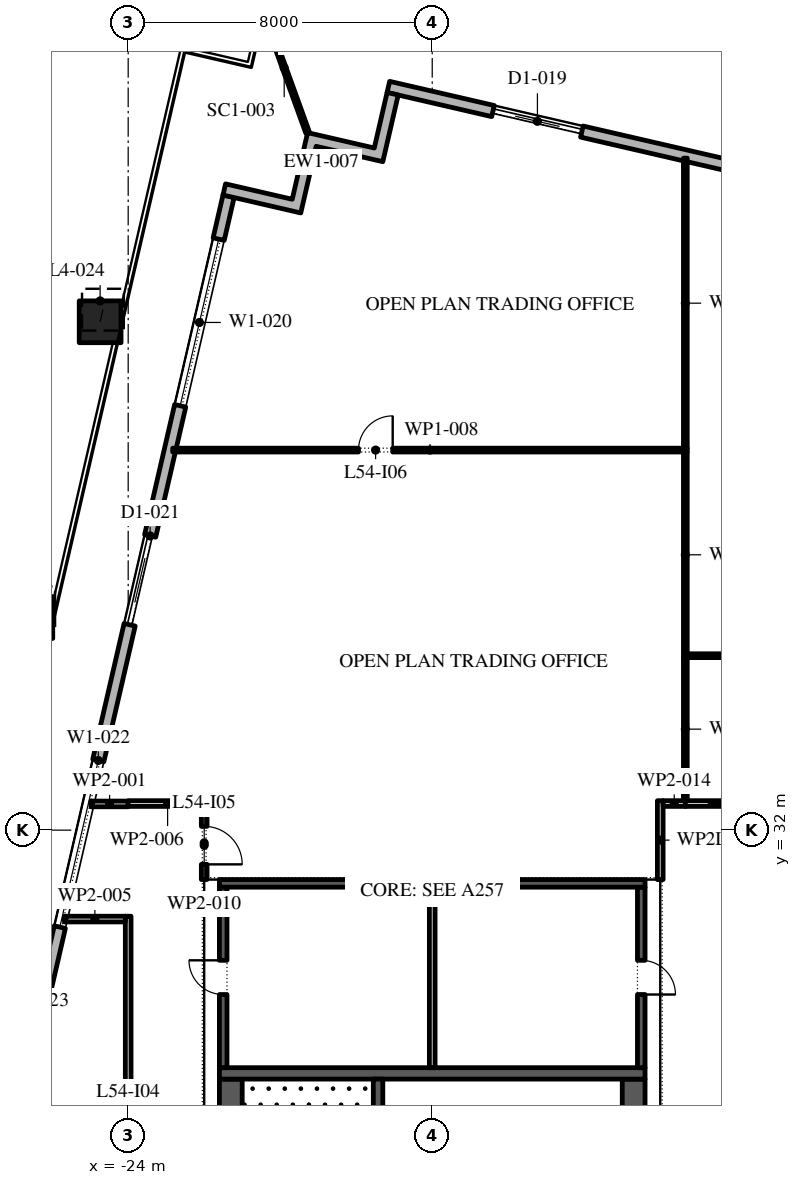
"""IFC4 building model, lengths in metres.
Left out: names, types, materials, properties, quantities, classifications, styles, units other than length and angle.
Written with IfcOpenShell. Run it as: python <this file> out.ifc"""

import sys

from ifc_helpers import new_model, si_unit, direction, frame, frame_2d, origin, origin_2d, place, context, subcontext, project, spatial, polyline, rectangle, outline, extrude, element, fill, save


model = new_model("IFC4")
c1 = context("Model", 3, precision=1e-05, world=origin(), true_north=direction((0.0, 1.0)))
c2 = subcontext(c1, "Body", "Model", "MODEL_VIEW")
j1 = project(units=[si_unit("LENGTHUNIT", "METRE"), si_unit("PLANEANGLEUNIT", "RADIAN")], contexts=[c1])
p1 = place(None, origin())
s1 = spatial("IfcSite", under=j1, at=p1, CompositionType="ELEMENT")
p2 = place(p1, origin())
s2 = spatial("IfcBuilding", under=s1, at=p2, CompositionType="ELEMENT")
p3 = place(p2, frame((0.0, 0.0, 251.4)))
s3 = spatial("IfcBuildingStorey", under=s2, at=p3, CompositionType="ELEMENT", Elevation=251.4)
p4 = place(p3, frame((-24.738, 45.376, 0.0), z_axis=(0.017443081717, 0.075683271502, 0.996979328429), x_axis=(-0.974454034257, 0.224587032398, 0.0)))
e1 = element("IfcColumn", 1, at=p4, inside=s3, PredefinedType="COLUMN", context=c2, shape_type="SweptSolid", body=[
    extrude(rectangle(XDim=1.1, YDim=1.1, at=origin_2d()), origin(), (0.0, 0.0, 1.0), 4.213),
])
p5 = place(p3, frame((-26.535, 37.594, 0.0), z_axis=(0.014558999143, 0.063108330945, 0.997900483069), x_axis=(-0.97440628778, 0.224794097641, 0.0)))
e2 = element("IfcColumn", 2, at=p5, inside=s3, PredefinedType="COLUMN", context=c2, shape_type="SweptSolid", body=[
    extrude(rectangle(XDim=1.1, YDim=1.1, at=origin_2d()), origin(), (0.0, 0.0, 1.0), 4.209),
])
p6 = place(p3, frame((29.616, 40.758, 0.0), z_axis=(0.0, 0.0, 1.0), x_axis=(-0.974370532314, 0.224949029246, 0.0)))
e3 = element("IfcWall", 3, at=p6, inside=s3, PredefinedType="STANDARD", context=c2, shape_type="SweptSolid", body=[
    extrude(rectangle(XDim=48.0, YDim=0.3, at=frame_2d((24.0, 0.0))), origin(), (0.0, 0.0, 1.0), 4.0),
])
p7 = place(p6, frame((1.625, 0.0, 0.45)))
e4 = element("IfcOpeningElement", 4, at=p7, cuts=e3, PredefinedType="OPENING", context=c2, shape_type="SweptSolid", body=[
    extrude(rectangle(XDim=4.5, YDim=2.675, at=frame_2d((2.25, 1.337))), frame((0.0, 0.16, 0.0), z_axis=(0.0, -1.0, 0.0), x_axis=(1.0, 0.0, 0.0)), (0.0, 0.0, 1.0), 0.32),
])
p8 = place(p6, frame((9.975, 0.0, 0.0)))
e5 = element("IfcOpeningElement", 5, at=p8, cuts=e3, PredefinedType="OPENING", context=c2, shape_type="SweptSolid", body=[
    extrude(rectangle(XDim=2.4, YDim=3.5, at=frame_2d((1.2, 1.75))), frame((0.0, 0.16, 0.0), z_axis=(0.0, -1.0, 0.0), x_axis=(1.0, 0.0, 0.0)), (0.0, 0.0, 1.0), 0.32),
])
p9 = place(p6, frame((17.575, 0.0, 0.45)))
e6 = element("IfcOpeningElement", 6, at=p9, cuts=e3, PredefinedType="OPENING", context=c2, shape_type="SweptSolid", body=[
    extrude(rectangle(XDim=4.5, YDim=2.525, at=frame_2d((2.25, 1.262))), frame((0.0, 0.16, 0.0), z_axis=(0.0, -1.0, 0.0), x_axis=(1.0, 0.0, 0.0)), (0.0, 0.0, 1.0), 0.32),
])
p10 = place(p6, frame((25.625, 0.0, 0.45)))
e7 = element("IfcOpeningElement", 7, at=p10, cuts=e3, PredefinedType="OPENING", context=c2, shape_type="SweptSolid", body=[
    extrude(rectangle(XDim=4.5, YDim=2.45, at=frame_2d((2.25, 1.225))), frame((0.0, 0.16, 0.0), z_axis=(0.0, -1.0, 0.0), x_axis=(1.0, 0.0, 0.0)), (0.0, 0.0, 1.0), 0.32),
])
p11 = place(p6, frame((33.675, 0.0, 0.45)))
e8 = element("IfcOpeningElement", 8, at=p11, cuts=e3, PredefinedType="OPENING", context=c2, shape_type="SweptSolid", body=[
    extrude(rectangle(XDim=4.5, YDim=2.45, at=frame_2d((2.25, 1.225))), frame((0.0, 0.16, 0.0), z_axis=(0.0, -1.0, 0.0), x_axis=(1.0, 0.0, 0.0)), (0.0, 0.0, 1.0), 0.32),
])
p12 = place(p6, frame((42.775, 0.0, 0.0)))
e9 = element("IfcOpeningElement", 9, at=p12, cuts=e3, PredefinedType="OPENING", context=c2, shape_type="SweptSolid", body=[
    extrude(rectangle(XDim=2.4, YDim=3.5, at=frame_2d((1.2, 1.75))), frame((0.0, 0.16, 0.0), z_axis=(0.0, -1.0, 0.0), x_axis=(1.0, 0.0, 0.0)), (0.0, 0.0, 1.0), 0.32),
])
p13 = place(p3, frame((-21.359, 48.678, 0.0), z_axis=(0.0, 0.0, 1.0), x_axis=(-0.224949198343, -0.974370493275, 0.0)))
e10 = element("IfcWall", 10, at=p13, inside=s3, PredefinedType="STANDARD", context=c2, shape_type="SweptSolid", body=[
    extrude(rectangle(XDim=49.5, YDim=0.3, at=frame_2d((24.75, 0.0))), origin(), (0.0, 0.0, 1.0), 4.0),
])
p14 = place(p13, frame((1.157, 0.0, 0.45)))
e11 = element("IfcOpeningElement", 11, at=p14, cuts=e10, PredefinedType="OPENING", context=c2, shape_type="SweptSolid", body=[
    extrude(rectangle(XDim=4.5, YDim=3.05, at=frame_2d((2.25, 1.525))), frame((0.0, 0.16, 0.0), z_axis=(0.0, -1.0, 0.0), x_axis=(1.0, 0.0, 0.0)), (0.0, 0.0, 1.0), 0.32),
])
p15 = place(p13, frame((9.171, 0.0, 0.0)))
e12 = element("IfcOpeningElement", 12, at=p15, cuts=e10, PredefinedType="OPENING", context=c2, shape_type="SweptSolid", body=[
    extrude(rectangle(XDim=2.4, YDim=3.5, at=frame_2d((1.2, 1.75))), frame((0.0, 0.16, 0.0), z_axis=(0.0, -1.0, 0.0), x_axis=(1.0, 0.0, 0.0)), (0.0, 0.0, 1.0), 0.32),
])
p16 = place(p13, frame((15.236, 0.0, 0.45)))
e13 = element("IfcOpeningElement", 13, at=p16, cuts=e10, PredefinedType="OPENING", context=c2, shape_type="SweptSolid", body=[
    extrude(rectangle(XDim=4.5, YDim=3.05, at=frame_2d((2.25, 1.525))), frame((0.0, 0.16, 0.0), z_axis=(0.0, -1.0, 0.0), x_axis=(1.0, 0.0, 0.0)), (0.0, 0.0, 1.0), 0.32),
])
p17 = place(p13, frame((22.35, 0.0, 0.45)))
e14 = element("IfcOpeningElement", 14, at=p17, cuts=e10, PredefinedType="OPENING", context=c2, shape_type="SweptSolid", body=[
    extrude(rectangle(XDim=4.5, YDim=3.05, at=frame_2d((2.25, 1.525))), frame((0.0, 0.16, 0.0), z_axis=(0.0, -1.0, 0.0), x_axis=(1.0, 0.0, 0.0)), (0.0, 0.0, 1.0), 0.32),
])
p18 = place(p13, frame((29.464, 0.0, 0.45)))
e15 = element("IfcOpeningElement", 15, at=p18, cuts=e10, PredefinedType="OPENING", context=c2, shape_type="SweptSolid", body=[
    extrude(rectangle(XDim=4.5, YDim=3.05, at=frame_2d((2.25, 1.525))), frame((0.0, 0.16, 0.0), z_axis=(0.0, -1.0, 0.0), x_axis=(1.0, 0.0, 0.0)), (0.0, 0.0, 1.0), 0.32),
])
p19 = place(p13, frame((37.628, 0.0, 0.0)))
e16 = element("IfcOpeningElement", 16, at=p19, cuts=e10, PredefinedType="OPENING", context=c2, shape_type="SweptSolid", body=[
    extrude(rectangle(XDim=2.4, YDim=3.325, at=frame_2d((1.2, 1.663))), frame((0.0, 0.16, 0.0), z_axis=(0.0, -1.0, 0.0), x_axis=(1.0, 0.0, 0.0)), (0.0, 0.0, 1.0), 0.32),
])
p20 = place(p13, frame((43.693, 0.0, 0.45)))
e17 = element("IfcOpeningElement", 17, at=p20, cuts=e10, PredefinedType="OPENING", context=c2, shape_type="SweptSolid", body=[
    extrude(rectangle(XDim=4.5, YDim=2.825, at=frame_2d((2.25, 1.413))), frame((0.0, 0.16, 0.0), z_axis=(0.0, -1.0, 0.0), x_axis=(1.0, 0.0, 0.0)), (0.0, 0.0, 1.0), 0.32),
])
p21 = place(p3, origin())
e18 = element("IfcWall", 18, at=p21, inside=s3, PredefinedType="STANDARD", context=c2, shape_type="SweptSolid", body=[
    extrude(outline(polyline([(-21.505, 48.712), (-21.438, 49.004), (-19.684, 48.599), (-19.279, 50.353), (-17.525, 49.948), (-17.188, 51.41), (-16.895, 51.342), (-17.3, 49.588), (-19.054, 49.993), (-19.459, 48.24), (-21.505, 48.712)])), origin(), (0.0, 0.0, 1.0), 4.0),
])
p22 = place(p3, frame((-19.279, 50.353, -0.05), z_axis=(0.0, 0.0, 1.0), x_axis=(-0.340464729294, 0.94025728825, 0.0)))
e19 = element("IfcWall", 19, at=p22, inside=s3, PredefinedType="STANDARD", context=c2, shape_type="SweptSolid", body=[
    extrude(rectangle(XDim=3.62, YDim=0.1, at=frame_2d((1.81, 0.0))), origin(), (0.0, 0.0, 1.0), 4.05),
])
p23 = place(p3, frame((-21.3, -2.45, 0.0), z_axis=(0.0, 0.0, 1.0), x_axis=(0.0, 1.0, 0.0)))
e20 = element("IfcWall", 20, at=p23, inside=s3, PredefinedType="SHEAR", context=c2, shape_type="SweptSolid", body=[
    extrude(rectangle(XDim=27.9, YDim=0.6, at=frame_2d((13.95, 0.0))), origin(), (0.0, 0.0, 1.0), 4.0),
])
p24 = place(p23, frame((5.05, 0.0, 0.0)))
e21 = element("IfcOpeningElement", 21, at=p24, cuts=e20, PredefinedType="OPENING", context=c2, shape_type="SweptSolid", body=[
    extrude(rectangle(XDim=1.2, YDim=2.1, at=frame_2d((0.6, 1.05))), frame((0.0, 0.31, 0.0), z_axis=(0.0, -1.0, 0.0), x_axis=(1.0, 0.0, 0.0)), (0.0, 0.0, 1.0), 0.62),
])
p25 = place(p23, frame((21.65, 0.0, 0.0)))
e22 = element("IfcOpeningElement", 22, at=p25, cuts=e20, PredefinedType="OPENING", context=c2, shape_type="SweptSolid", body=[
    extrude(rectangle(XDim=1.2, YDim=2.1, at=frame_2d((0.6, 1.05))), frame((0.0, 0.31, 0.0), z_axis=(0.0, -1.0, 0.0), x_axis=(1.0, 0.0, 0.0)), (0.0, 0.0, 1.0), 0.62),
])
p26 = place(p3, frame((-10.7, -2.45, 0.0), z_axis=(0.0, 0.0, 1.0), x_axis=(0.0, 1.0, 0.0)))
e23 = element("IfcWall", 23, at=p26, inside=s3, PredefinedType="SHEAR", context=c2, shape_type="SweptSolid", body=[
    extrude(rectangle(XDim=27.9, YDim=0.6, at=frame_2d((13.95, 0.0))), origin(), (0.0, 0.0, 1.0), 4.0),
])
p27 = place(p26, frame((23.65, 0.0, 0.0)))
e24 = element("IfcOpeningElement", 24, at=p27, cuts=e23, PredefinedType="OPENING", context=c2, shape_type="SweptSolid", body=[
    extrude(rectangle(XDim=2.4, YDim=2.1, at=frame_2d((1.2, 1.05))), frame((0.0, 0.31, 0.0), z_axis=(0.0, -1.0, 0.0), x_axis=(1.0, 0.0, 0.0)), (0.0, 0.0, 1.0), 0.62),
])
p28 = place(p26, frame((1.387, 0.0, 0.0)))
e25 = element("IfcOpeningElement", 25, at=p28, cuts=e23, PredefinedType="OPENING", context=c2, shape_type="SweptSolid", body=[
    extrude(rectangle(XDim=0.9, YDim=2.1, at=frame_2d((0.45, 1.05))), frame((0.0, 0.31, 0.0), z_axis=(0.0, -1.0, 0.0), x_axis=(1.0, 0.0, 0.0)), (0.0, 0.0, 1.0), 0.62),
])
p29 = place(p26, frame((4.562, 0.0, 0.0)))
e26 = element("IfcOpeningElement", 26, at=p29, cuts=e23, PredefinedType="OPENING", context=c2, shape_type="SweptSolid", body=[
    extrude(rectangle(XDim=1.0, YDim=2.1, at=frame_2d((0.5, 1.05))), frame((0.0, 0.31, 0.0), z_axis=(0.0, -1.0, 0.0), x_axis=(1.0, 0.0, 0.0)), (0.0, 0.0, 1.0), 0.62),
])
p30 = place(p3, frame((-21.6, 25.6, 0.0), z_axis=(0.0, 0.0, 1.0), x_axis=(1.0, 0.0, 0.0)))
e27 = element("IfcWall", 27, at=p30, inside=s3, PredefinedType="SHEAR", context=c2, shape_type="SweptSolid", body=[
    extrude(rectangle(XDim=11.2, YDim=0.3, at=frame_2d((5.6, 0.0))), origin(), (0.0, 0.0, 1.0), 4.0),
])
p31 = place(p3, frame((-17.425, 19.15, 0.0), z_axis=(0.0, 0.0, 1.0), x_axis=(0.0, 1.0, 0.0)))
e28 = element("IfcWall", 28, at=p31, inside=s3, PredefinedType="SHEAR", context=c2, shape_type="SweptSolid", body=[
    extrude(rectangle(XDim=6.3, YDim=0.25, at=frame_2d((3.15, 0.0))), origin(), (0.0, 0.0, 1.0), 4.0),
])
p32 = place(p31, frame((0.05, 0.0, 0.0)))
e29 = element("IfcOpeningElement", 29, at=p32, cuts=e28, PredefinedType="OPENING", context=c2, shape_type="SweptSolid", body=[
    extrude(rectangle(XDim=1.2, YDim=2.1, at=frame_2d((0.6, 1.05))), frame((0.0, 0.135, 0.0), z_axis=(0.0, -1.0, 0.0), x_axis=(1.0, 0.0, 0.0)), (0.0, 0.0, 1.0), 0.27),
])
p33 = place(p3, frame((-21.5, 25.75, 0.0), z_axis=(0.0, 0.0, 1.0), x_axis=(0.0, 1.0, 0.0)))
e30 = element("IfcWall", 30, at=p33, inside=s3, PredefinedType="SHEAR", context=c2, shape_type="SweptSolid", body=[
    extrude(rectangle(XDim=4.75, YDim=0.2, at=frame_2d((2.375, 0.0))), origin(), (0.0, 0.0, 1.0), 4.0),
])
p34 = place(p33, frame((1.925, 0.0, 0.0)))
e31 = element("IfcOpeningElement", 31, at=p34, cuts=e30, PredefinedType="OPENING", context=c2, shape_type="SweptSolid", body=[
    extrude(rectangle(XDim=0.9, YDim=2.1, at=frame_2d((0.45, 1.05))), frame((0.0, 0.11, 0.0), z_axis=(0.0, -1.0, 0.0), x_axis=(1.0, 0.0, 0.0)), (0.0, 0.0, 1.0), 0.22),
])
p35 = place(p3, frame((-10.5, 25.75, 0.0), z_axis=(0.0, 0.0, 1.0), x_axis=(0.0, 1.0, 0.0)))
e32 = element("IfcWall", 32, at=p35, inside=s3, PredefinedType="SHEAR", context=c2, shape_type="SweptSolid", body=[
    extrude(rectangle(XDim=4.75, YDim=0.2, at=frame_2d((2.375, 0.0))), origin(), (0.0, 0.0, 1.0), 4.0),
])
p36 = place(p35, frame((1.925, 0.0, 0.0)))
e33 = element("IfcOpeningElement", 33, at=p36, cuts=e32, PredefinedType="OPENING", context=c2, shape_type="SweptSolid", body=[
    extrude(rectangle(XDim=0.9, YDim=2.1, at=frame_2d((0.45, 1.05))), frame((0.0, 0.11, 0.0), z_axis=(0.0, -1.0, 0.0), x_axis=(1.0, 0.0, 0.0)), (0.0, 0.0, 1.0), 0.22),
])
p37 = place(p3, frame((-21.6, 30.6, 0.0), z_axis=(0.0, 0.0, 1.0), x_axis=(1.0, 0.0, 0.0)))
e34 = element("IfcWall", 34, at=p37, inside=s3, PredefinedType="SHEAR", context=c2, shape_type="SweptSolid", body=[
    extrude(rectangle(XDim=11.2, YDim=0.2, at=frame_2d((5.6, 0.0))), origin(), (0.0, 0.0, 1.0), 4.0),
])
p38 = place(p3, frame((-16.0, 25.75, 0.0), z_axis=(0.0, 0.0, 1.0), x_axis=(0.0, 1.0, 0.0)))
e35 = element("IfcWall", 35, at=p38, inside=s3, PredefinedType="PARTITIONING", context=c2, shape_type="SweptSolid", body=[
    extrude(rectangle(XDim=4.75, YDim=0.15, at=frame_2d((2.375, 0.0))), origin(), (0.0, 0.0, 1.0), 4.0),
])
p39 = place(p3, frame((-24.979, 32.69, 0.0), z_axis=(0.0, 0.0, 1.0), x_axis=(1.0, 0.0, 0.0)))
e36 = element("IfcWall", 36, at=p39, inside=s3, PredefinedType="PARTITIONING", context=c2, shape_type="SweptSolid", body=[
    extrude(rectangle(XDim=0.979, YDim=0.15, at=frame_2d((0.49, 0.0))), origin(), (0.0, 0.0, 1.0), 4.0),
])
p40 = place(p3, frame((-24.0, 15.79, 0.0), z_axis=(0.0, 0.0, 1.0), x_axis=(0.0, 1.0, 0.0)))
e37 = element("IfcWall", 37, at=p40, inside=s3, PredefinedType="PARTITIONING", context=c2, shape_type="SweptSolid", body=[
    extrude(rectangle(XDim=13.945, YDim=0.15, at=frame_2d((6.973, 0.0))), origin(), (0.0, 0.0, 1.0), 4.0),
])
p41 = place(p40, frame((7.72, 0.0, 0.0)))
e38 = element("IfcOpeningElement", 38, at=p41, cuts=e37, PredefinedType="OPENING", context=c2, shape_type="SweptSolid", body=[
    extrude(rectangle(XDim=1.0, YDim=2.1, at=frame_2d((0.5, 1.05))), frame((0.0, 0.085, 0.0), z_axis=(0.0, -1.0, 0.0), x_axis=(1.0, 0.0, 0.0)), (0.0, 0.0, 1.0), 0.17),
])
p42 = place(p3, frame((-24.075, 29.66, 0.0), z_axis=(0.0, 0.0, 1.0), x_axis=(-1.0, 0.0, 0.0)))
e39 = element("IfcWall", 39, at=p42, inside=s3, PredefinedType="PARTITIONING", context=c2, shape_type="SweptSolid", body=[
    extrude(rectangle(XDim=1.603, YDim=0.15, at=frame_2d((0.802, 0.0))), origin(), (0.0, 0.0, 1.0), 4.0),
])
p43 = place(p3, frame((-24.0, 32.7, 0.0), z_axis=(0.0, 0.0, 1.0), x_axis=(1.0, 0.0, 0.0)))
e40 = element("IfcWall", 40, at=p43, inside=s3, PredefinedType="PARTITIONING", context=c2, shape_type="SweptSolid", body=[
    extrude(rectangle(XDim=2.075, YDim=0.15, at=frame_2d((1.038, 0.0))), origin(), (0.0, 0.0, 1.0), 4.0),
])
p44 = place(p3, frame((-22.829, 42.0, 0.0), z_axis=(0.0, 0.0, 1.0), x_axis=(1.0, 0.0, 0.0)))
e41 = element("IfcWall", 41, at=p44, inside=s3, PredefinedType="PARTITIONING", context=c2, shape_type="SweptSolid", body=[
    extrude(rectangle(XDim=13.539, YDim=0.1, at=frame_2d((6.77, 0.0))), origin(), (0.0, 0.0, 1.0), 4.0),
])
p45 = place(p44, frame((4.889, 0.0, 0.0)))
e42 = element("IfcOpeningElement", 42, at=p45, cuts=e41, PredefinedType="OPENING", context=c2, shape_type="SweptSolid", body=[
    extrude(rectangle(XDim=0.9, YDim=2.1, at=frame_2d((0.45, 1.05))), frame((0.0, 0.06, 0.0), z_axis=(0.0, -1.0, 0.0), x_axis=(1.0, 0.0, 0.0)), (0.0, 0.0, 1.0), 0.12),
])
p46 = place(p3, frame((-22.0, 32.625, 0.0), z_axis=(0.0, 0.0, 1.0), x_axis=(0.0, -1.0, 0.0)))
e43 = element("IfcWall", 43, at=p46, inside=s3, PredefinedType="PARTITIONING", context=c2, shape_type="SweptSolid", body=[
    extrude(rectangle(XDim=1.925, YDim=0.15, at=frame_2d((0.962, 0.0))), origin(), (0.0, 0.0, 1.0), 4.0),
])
p47 = place(p46, frame((0.525, 0.0, 0.0)))
e44 = element("IfcOpeningElement", 44, at=p47, cuts=e43, PredefinedType="OPENING", context=c2, shape_type="SweptSolid", body=[
    extrude(rectangle(XDim=1.0, YDim=2.1, at=frame_2d((0.5, 1.05))), frame((0.0, 0.085, 0.0), z_axis=(0.0, -1.0, 0.0), x_axis=(1.0, 0.0, 0.0)), (0.0, 0.0, 1.0), 0.17),
])
p48 = place(p3, frame((-10.0, 30.7, 0.0), z_axis=(0.0, 0.0, 1.0), x_axis=(0.0, 1.0, 0.0)))
e45 = element("IfcWall", 45, at=p48, inside=s3, PredefinedType="PARTITIONING", context=c2, shape_type="SweptSolid", body=[
    extrude(rectangle(XDim=2.075, YDim=0.15, at=frame_2d((1.038, 0.0))), origin(), (0.0, 0.0, 1.0), 3.02),
])
p49 = place(p3, frame((-9.925, 32.7, 0.0), z_axis=(0.0, 0.0, 1.0), x_axis=(1.0, 0.0, 0.0)))
e46 = element("IfcWall", 46, at=p49, inside=s3, PredefinedType="PARTITIONING", context=c2, shape_type="SweptSolid", body=[
    extrude(rectangle(XDim=0.585, YDim=0.15, at=frame_2d((0.292, 0.0))), origin(), (0.0, 0.0, 1.0), 4.0),
])
p50 = place(p3, frame((-9.34, 32.775, 0.0), z_axis=(0.0, 0.0, 1.0), x_axis=(0.0, 1.0, 0.0)))
e47 = element("IfcWall", 47, at=p50, inside=s3, PredefinedType="PARTITIONING", context=c2, shape_type="SweptSolid", body=[
    extrude(rectangle(XDim=3.765, YDim=0.1, at=frame_2d((1.883, 0.0))), origin(), (0.0, 0.0, 1.0), 4.0),
])
p51 = place(p3, frame((-9.34, 32.7, 0.0), z_axis=(0.0, 0.0, 1.0), x_axis=(1.0, 0.0, 0.0)))
e48 = element("IfcWall", 48, at=p51, inside=s3, PredefinedType="PARTITIONING", context=c2, shape_type="SweptSolid", body=[
    extrude(rectangle(XDim=1.415, YDim=0.15, at=frame_2d((0.708, 0.0))), origin(), (0.0, 0.0, 1.0), 4.0),
])
p52 = place(p3, frame((-9.34, 36.54, 0.0), z_axis=(0.0, 0.0, 1.0), x_axis=(0.0, 1.0, 0.0)))
e49 = element("IfcWall", 49, at=p52, inside=s3, PredefinedType="PARTITIONING", context=c2, shape_type="SweptSolid", body=[
    extrude(rectangle(XDim=5.41, YDim=0.1, at=frame_2d((2.705, 0.0))), origin(), (0.0, 0.0, 1.0), 4.0),
])
p53 = place(p3, frame((-9.29, 36.59, 0.0), z_axis=(0.0, 0.0, 1.0), x_axis=(1.0, 0.0, 0.0)))
e50 = element("IfcWall", 50, at=p53, inside=s3, PredefinedType="PARTITIONING", context=c2, shape_type="SweptSolid", body=[
    extrude(rectangle(XDim=8.265, YDim=0.1, at=frame_2d((4.133, 0.0))), origin(), (0.0, 0.0, 1.0), 4.0),
])
p54 = place(p3, frame((-9.34, 42.05, 0.0), z_axis=(0.0, 0.0, 1.0), x_axis=(0.0, 1.0, 0.0)))
e51 = element("IfcWall", 51, at=p54, inside=s3, PredefinedType="PARTITIONING", context=c2, shape_type="SweptSolid", body=[
    extrude(rectangle(XDim=7.631, YDim=0.1, at=frame_2d((3.815, 0.0))), origin(), (0.0, 0.0, 1.0), 4.0),
])
p55 = place(p12, origin())
e52 = element("IfcDoor", 52, at=p55, inside=s3, OperationType="DOUBLE_DOOR_SLIDING", PredefinedType="DOOR", context=c2, shape_type="SweptSolid", body=[
    extrude(rectangle(XDim=2.4, YDim=3.5, at=frame_2d((1.2, 1.75))), frame((0.0, 0.025, 0.0), z_axis=(0.0, -1.0, 0.0), x_axis=(1.0, 0.0, 0.0)), (0.0, 0.0, 1.0), 0.05),
])
fill(e9, e52)
p56 = place(p14, origin())
e53 = element("IfcWindow", 53, at=p56, inside=s3, PartitioningType="DOUBLE_PANEL_VERTICAL", PredefinedType="WINDOW", context=c2, shape_type="SweptSolid", body=[
    extrude(rectangle(XDim=4.5, YDim=3.05, at=frame_2d((2.25, 1.525))), frame((0.0, 0.03, 0.0), z_axis=(0.0, -1.0, 0.0), x_axis=(1.0, 0.0, 0.0)), (0.0, 0.0, 1.0), 0.06),
])
fill(e11, e53)
p57 = place(p15, origin())
e54 = element("IfcDoor", 54, at=p57, inside=s3, OperationType="DOUBLE_DOOR_SLIDING", PredefinedType="DOOR", context=c2, shape_type="SweptSolid", body=[
    extrude(rectangle(XDim=2.4, YDim=3.5, at=frame_2d((1.2, 1.75))), frame((0.0, 0.025, 0.0), z_axis=(0.0, -1.0, 0.0), x_axis=(1.0, 0.0, 0.0)), (0.0, 0.0, 1.0), 0.05),
])
fill(e12, e54)
p58 = place(p16, origin())
e55 = element("IfcWindow", 55, at=p58, inside=s3, PartitioningType="DOUBLE_PANEL_VERTICAL", PredefinedType="WINDOW", context=c2, shape_type="SweptSolid", body=[
    extrude(rectangle(XDim=4.5, YDim=3.05, at=frame_2d((2.25, 1.525))), frame((0.0, 0.03, 0.0), z_axis=(0.0, -1.0, 0.0), x_axis=(1.0, 0.0, 0.0)), (0.0, 0.0, 1.0), 0.06),
])
fill(e13, e55)
p59 = place(p34, origin())
e56 = element("IfcDoor", 56, at=p59, inside=s3, OperationType="SINGLE_SWING_LEFT", PredefinedType="DOOR", context=c2, shape_type="SweptSolid", body=[
    extrude(rectangle(XDim=0.9, YDim=2.1, at=frame_2d((0.45, 1.05))), frame((0.0, -0.05, 0.0), z_axis=(0.0, -1.0, 0.0), x_axis=(1.0, 0.0, 0.0)), (0.0, 0.0, 1.0), 0.05),
])
fill(e31, e56)
p60 = place(p36, frame((0.9, 0.15, 0.0), z_axis=(0.0, 0.0, 1.0), x_axis=(-1.0, 0.0, 0.0)))
e57 = element("IfcDoor", 57, at=p60, inside=s3, OperationType="SINGLE_SWING_LEFT", PredefinedType="DOOR", context=c2, shape_type="SweptSolid", body=[
    extrude(rectangle(XDim=0.9, YDim=2.1, at=frame_2d((0.45, 1.05))), frame((0.0, 0.1, 0.0), z_axis=(0.0, -1.0, 0.0), x_axis=(1.0, 0.0, 0.0)), (0.0, 0.0, 1.0), 0.05),
])
fill(e33, e57)
p61 = place(p47, origin())
e58 = element("IfcDoor", 58, at=p61, inside=s3, OperationType="SINGLE_SWING_LEFT", PredefinedType="DOOR", context=c2, shape_type="SweptSolid", body=[
    extrude(rectangle(XDim=1.0, YDim=2.1, at=frame_2d((0.5, 1.05))), frame((0.0, 0.025, 0.0), z_axis=(0.0, -1.0, 0.0), x_axis=(1.0, 0.0, 0.0)), (0.0, 0.0, 1.0), 0.05),
])
fill(e44, e58)
p62 = place(p45, origin())
e59 = element("IfcDoor", 59, at=p62, inside=s3, OperationType="SINGLE_SWING_LEFT", PredefinedType="DOOR", context=c2, shape_type="SweptSolid", body=[
    extrude(rectangle(XDim=0.9, YDim=2.1, at=frame_2d((0.45, 1.05))), frame((0.0, 0.025, 0.0), z_axis=(0.0, -1.0, 0.0), x_axis=(1.0, 0.0, 0.0)), (0.0, 0.0, 1.0), 0.05),
])
fill(e42, e59)
save(model, sys.argv[1])
